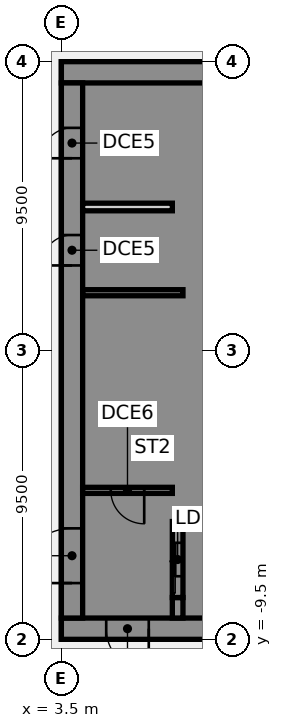
"""IFC4 building model, lengths in metres.
Left out: names, types, materials, properties, quantities, classifications, styles, units other than length and angle.
Written with IfcOpenShell. Run it as: python <this file> out.ifc"""

import sys

from ifc_helpers import new_model, si_unit, direction, frame, frame_2d, origin, place, context, subcontext, project, spatial, polyline, rectangle, outline, extrude, element, fill, save


model = new_model("IFC4")
c1 = context("Model", 3, precision=1e-05, world=origin(), true_north=direction((0.0, 1.0)))
c2 = subcontext(c1, "Body", "Model", "MODEL_VIEW")
j1 = project(units=[si_unit("LENGTHUNIT", "METRE"), si_unit("PLANEANGLEUNIT", "RADIAN")], contexts=[c1])
p1 = place(None, origin())
s1 = spatial("IfcSite", under=j1, at=p1, CompositionType="ELEMENT")
p2 = place(p1, origin())
s2 = spatial("IfcBuilding", under=s1, at=p2, CompositionType="ELEMENT")
p3 = place(p2, frame((0.0, 0.0, 41.5)))
s3 = spatial("IfcBuildingStorey", under=s2, at=p3, CompositionType="ELEMENT", Elevation=41.5)
p4 = place(p3, frame((16.5, -9.15, 0.0), z_axis=(0.0, 0.0, 1.0), x_axis=(-1.0, 0.0, 0.0)))
e1 = element("IfcWall", 1, at=p4, inside=s3, PredefinedType="SHEAR", context=c2, shape_type="SweptSolid", body=[
    extrude(rectangle(XDim=13.0, YDim=0.7, at=frame_2d((6.5, 0.0))), origin(), (0.0, 0.0, 1.0), 3.61),
])
p5 = place(p4, frame((4.15, 0.0, 0.0)))
e2 = element("IfcOpeningElement", 2, at=p5, cuts=e1, PredefinedType="OPENING", context=c2, shape_type="SweptSolid", body=[
    extrude(rectangle(XDim=1.4, YDim=2.1, at=frame_2d((0.7, 1.05))), frame((0.0, 0.36, 0.0), z_axis=(0.0, -1.0, 0.0), x_axis=(1.0, 0.0, 0.0)), (0.0, 0.0, 1.0), 0.72),
])
p6 = place(p4, frame((10.125, 0.0, 0.0)))
e3 = element("IfcOpeningElement", 3, at=p6, cuts=e1, PredefinedType="OPENING", context=c2, shape_type="SweptSolid", body=[
    extrude(rectangle(XDim=1.4, YDim=2.1, at=frame_2d((0.7, 1.05))), frame((0.0, 0.36, 0.0), z_axis=(0.0, -1.0, 0.0), x_axis=(1.0, 0.0, 0.0)), (0.0, 0.0, 1.0), 0.72),
])
p7 = place(p3, frame((16.5, 9.15, 0.0), z_axis=(0.0, 0.0, 1.0), x_axis=(-1.0, 0.0, 0.0)))
e4 = element("IfcWall", 4, at=p7, inside=s3, PredefinedType="SHEAR", context=c2, shape_type="SweptSolid", body=[
    extrude(rectangle(XDim=13.0, YDim=0.7, at=frame_2d((6.5, 0.0))), origin(), (0.0, 0.0, 1.0), 3.61),
])
p8 = place(p3, origin())
e5 = element("IfcWall", 5, at=p8, inside=s3, PredefinedType="SHEAR", context=c2, shape_type="SweptSolid", body=[
    extrude(outline(polyline([(9.8, -5.375), (7.5, -5.375), (7.5, -2.875), (9.8, -2.875), (9.8, -2.625), (7.5, -2.625), (7.5, -0.125), (9.8, -0.125), (9.8, 0.125), (7.5, 0.125), (7.5, 2.625), (9.8, 2.625), (9.8, 2.875), (7.5, 2.875), (7.5, 5.375), (9.8, 5.375), (9.8, 5.625), (7.5, 5.625), (7.5, 8.125), (9.8, 8.125), (9.8, 8.8), (7.5, 8.8), (7.15, 8.8), (7.15, -5.625), (7.5, -5.625), (9.8, -5.625), (9.8, -5.375)])), origin(), (0.0, 0.0, 1.0), 3.61),
])
p9 = place(p3, origin())
e6 = element("IfcWall", 6, at=p9, inside=s3, PredefinedType="SHEAR", context=c2, shape_type="SweptSolid", body=[
    extrude(outline(polyline([(7.5, -8.125), (7.5, -8.8), (9.8, -8.8), (9.8, -8.125), (9.8, -5.625), (9.55, -5.625), (9.55, -8.125), (7.5, -8.125)])), origin(), (0.0, 0.0, 1.0), 3.61),
])
p10 = place(p3, frame((7.325, -8.8, 0.0), z_axis=(0.0, 0.0, 1.0), x_axis=(0.0, 1.0, 0.0)))
e7 = element("IfcWall", 7, at=p10, inside=s3, PredefinedType="SHEAR", context=c2, shape_type="SweptSolid", body=[
    extrude(rectangle(XDim=0.675, YDim=0.35, at=frame_2d((0.337, 0.0))), origin(), (0.0, 0.0, 1.0), 3.61),
])
p11 = place(p3, frame((7.5, 1.9, 0.0), z_axis=(0.0, 0.0, 1.0), x_axis=(-1.0, 0.0, 0.0)))
e8 = element("IfcWall", 8, at=p11, inside=s3, PredefinedType="SHEAR", context=c2, shape_type="SweptSolid", body=[
    extrude(rectangle(XDim=3.3, YDim=0.2, at=frame_2d((1.65, 0.0))), origin(), (0.0, 0.0, 1.0), 3.61),
])
p12 = place(p3, frame((7.325, -8.125, 0.0), z_axis=(0.0, 0.0, 1.0), x_axis=(0.0, 1.0, 0.0)))
e9 = element("IfcWall", 9, at=p12, inside=s3, PredefinedType="SHEAR", context=c2, shape_type="SweptSolid", body=[
    extrude(rectangle(XDim=2.5, YDim=0.35, at=frame_2d((1.25, 0.0))), origin(), (0.0, 0.0, 1.0), 3.61),
])
p13 = place(p12, frame((0.7, 0.0, 0.0)))
e10 = element("IfcOpeningElement", 10, at=p13, cuts=e9, PredefinedType="OPENING", context=c2, shape_type="SweptSolid", body=[
    extrude(rectangle(XDim=1.1, YDim=2.1, at=frame_2d((0.55, 1.05))), frame((0.0, 0.185, 0.0), z_axis=(0.0, -1.0, 0.0), x_axis=(1.0, 0.0, 0.0)), (0.0, 0.0, 1.0), 0.37),
])
p14 = place(p3, frame((3.85, -8.8, 0.0), z_axis=(0.0, 0.0, 1.0), x_axis=(0.0, 1.0, 0.0)))
e11 = element("IfcWall", 11, at=p14, inside=s3, PredefinedType="SHEAR", context=c2, shape_type="SweptSolid", body=[
    extrude(rectangle(XDim=17.6, YDim=0.7, at=frame_2d((8.8, 0.0))), origin(), (0.0, 0.0, 1.0), 3.61),
])
p15 = place(p14, frame((1.15, 0.0, 0.0)))
e12 = element("IfcOpeningElement", 12, at=p15, cuts=e11, PredefinedType="OPENING", context=c2, shape_type="SweptSolid", body=[
    extrude(rectangle(XDim=1.8, YDim=2.1, at=frame_2d((0.9, 1.05))), frame((0.0, 0.36, 0.0), z_axis=(0.0, -1.0, 0.0), x_axis=(1.0, 0.0, 0.0)), (0.0, 0.0, 1.0), 0.72),
])
p16 = place(p14, frame((11.597, 0.0, 0.0)))
e13 = element("IfcOpeningElement", 13, at=p16, cuts=e11, PredefinedType="OPENING", context=c2, shape_type="SweptSolid", body=[
    extrude(rectangle(XDim=1.0, YDim=2.1, at=frame_2d((0.5, 1.05))), frame((0.0, 0.36, 0.0), z_axis=(0.0, -1.0, 0.0), x_axis=(1.0, 0.0, 0.0)), (0.0, 0.0, 1.0), 0.72),
])
p17 = place(p14, frame((15.123, 0.0, 0.0)))
e14 = element("IfcOpeningElement", 14, at=p17, cuts=e11, PredefinedType="OPENING", context=c2, shape_type="SweptSolid", body=[
    extrude(rectangle(XDim=1.0, YDim=2.1, at=frame_2d((0.5, 1.05))), frame((0.0, 0.36, 0.0), z_axis=(0.0, -1.0, 0.0), x_axis=(1.0, 0.0, 0.0)), (0.0, 0.0, 1.0), 0.72),
])
p18 = place(p3, frame((7.15, 4.72, 0.0), z_axis=(0.0, 0.0, 1.0), x_axis=(-1.0, 0.0, 0.0)))
e15 = element("IfcWall", 15, at=p18, inside=s3, PredefinedType="PARTITIONING", context=c2, shape_type="SweptSolid", body=[
    extrude(rectangle(XDim=2.95, YDim=0.25, at=frame_2d((1.475, 0.0))), origin(), (0.0, 0.0, 1.0), 3.61),
])
p19 = place(p3, frame((7.15, -4.6, 0.0), z_axis=(0.0, 0.0, 1.0), x_axis=(-1.0, 0.0, 0.0)))
e16 = element("IfcWall", 16, at=p19, inside=s3, PredefinedType="SHEAR", context=c2, shape_type="SweptSolid", body=[
    extrude(rectangle(XDim=2.95, YDim=0.2, at=frame_2d((1.475, 0.0))), origin(), (0.0, 0.0, 1.0), 3.61),
])
p20 = place(p19, frame((0.925, 0.0, 0.0)))
e17 = element("IfcOpeningElement", 17, at=p20, cuts=e16, PredefinedType="OPENING", context=c2, shape_type="SweptSolid", body=[
    extrude(rectangle(XDim=1.1, YDim=2.1, at=frame_2d((0.55, 1.05))), frame((0.0, 0.11, 0.0), z_axis=(0.0, -1.0, 0.0), x_axis=(1.0, 0.0, 0.0)), (0.0, 0.0, 1.0), 0.22),
])
p21 = place(p6, origin())
e18 = element("IfcDoor", 18, at=p21, inside=s3, OperationType="SINGLE_SWING_LEFT", PredefinedType="DOOR", context=c2, shape_type="SweptSolid", body=[
    extrude(rectangle(XDim=1.4, YDim=2.1, at=frame_2d((0.7, 1.05))), frame((0.0, 0.025, 0.0), z_axis=(0.0, -1.0, 0.0), x_axis=(1.0, 0.0, 0.0)), (0.0, 0.0, 1.0), 0.05),
])
fill(e3, e18)
p22 = place(p15, origin())
e19 = element("IfcDoor", 19, at=p22, inside=s3, OperationType="SINGLE_SWING_LEFT", PredefinedType="DOOR", context=c2, shape_type="SweptSolid", body=[
    extrude(rectangle(XDim=1.8, YDim=2.1, at=frame_2d((0.9, 1.05))), frame((0.0, 0.025, 0.0), z_axis=(0.0, -1.0, 0.0), x_axis=(1.0, 0.0, 0.0)), (0.0, 0.0, 1.0), 0.05),
])
fill(e12, e19)
p23 = place(p16, origin())
e20 = element("IfcDoor", 20, at=p23, inside=s3, OperationType="SINGLE_SWING_LEFT", PredefinedType="DOOR", context=c2, shape_type="SweptSolid", body=[
    extrude(rectangle(XDim=1.0, YDim=2.1, at=frame_2d((0.5, 1.05))), frame((0.0, -0.275, 0.0), z_axis=(0.0, -1.0, 0.0), x_axis=(1.0, 0.0, 0.0)), (0.0, 0.0, 1.0), 0.05),
])
fill(e13, e20)
p24 = place(p17, origin())
e21 = element("IfcDoor", 21, at=p24, inside=s3, OperationType="SINGLE_SWING_LEFT", PredefinedType="DOOR", context=c2, shape_type="SweptSolid", body=[
    extrude(rectangle(XDim=1.0, YDim=2.1, at=frame_2d((0.5, 1.05))), frame((0.0, -0.275, 0.0), z_axis=(0.0, -1.0, 0.0), x_axis=(1.0, 0.0, 0.0)), (0.0, 0.0, 1.0), 0.05),
])
fill(e14, e21)
p25 = place(p20, origin())
e22 = element("IfcDoor", 22, at=p25, inside=s3, OperationType="SINGLE_SWING_LEFT", PredefinedType="DOOR", context=c2, shape_type="SweptSolid", body=[
    extrude(rectangle(XDim=1.1, YDim=2.1, at=frame_2d((0.55, 1.05))), frame((0.0, 0.025, 0.0), z_axis=(0.0, -1.0, 0.0), x_axis=(1.0, 0.0, 0.0)), (0.0, 0.0, 1.0), 0.05),
])
fill(e17, e22)
p26 = place(p13, origin())
e23 = element("IfcDoor", 23, at=p26, inside=s3, OperationType="SLIDING_TO_LEFT", PredefinedType="DOOR", context=c2, shape_type="SweptSolid", body=[
    extrude(rectangle(XDim=1.1, YDim=2.1, at=frame_2d((0.55, 1.05))), frame((0.0, 0.025, 0.0), z_axis=(0.0, -1.0, 0.0), x_axis=(1.0, 0.0, 0.0)), (0.0, 0.0, 1.0), 0.05),
])
fill(e10, e23)
save(model, sys.argv[1])
